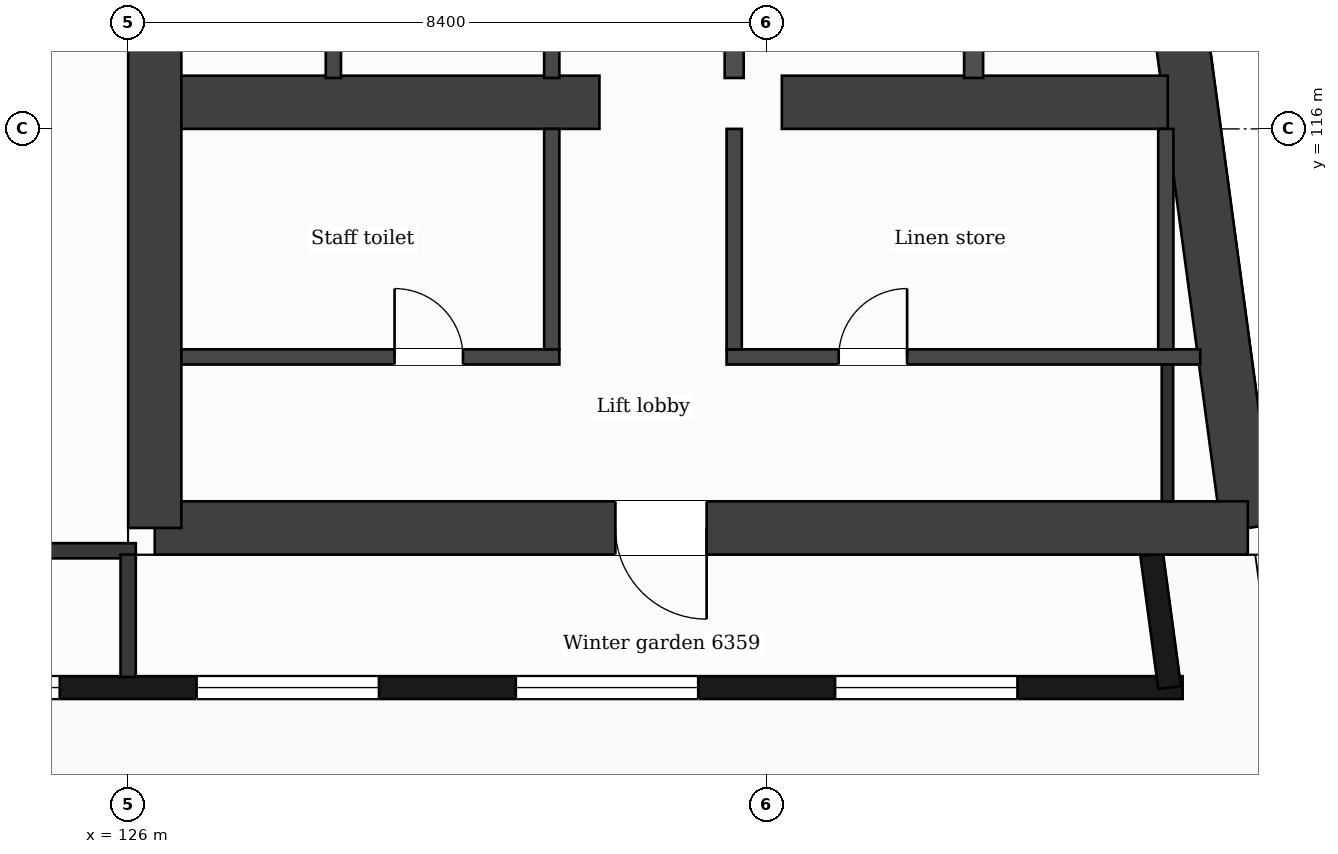
"""IFC4 building model, lengths in metres.
Left out: names, types, materials, properties, quantities, classifications, styles, units other than length and angle.
Written with IfcOpenShell. Run it as: python <this file> out.ifc"""

import sys

from ifc_helpers import new_model, si_unit, direction, frame, frame_2d, origin, place, context, subcontext, project, spatial, rectangle, extrude, element, fill, save


model = new_model("IFC4")
c1 = context("Model", 3, precision=1e-05, world=origin(), true_north=direction((0.0, 1.0)))
c2 = subcontext(c1, "Body", "Model", "MODEL_VIEW")
j1 = project(units=[si_unit("LENGTHUNIT", "METRE"), si_unit("PLANEANGLEUNIT", "RADIAN")], contexts=[c1])
p1 = place(None, origin())
s1 = spatial("IfcSite", under=j1, at=p1, CompositionType="ELEMENT")
p2 = place(p1, origin())
s2 = spatial("IfcBuilding", under=s1, at=p2, CompositionType="ELEMENT")
p3 = place(p2, frame((0.0, 0.0, 262.7)))
s3 = spatial("IfcBuildingStorey", under=s2, at=p3, CompositionType="ELEMENT", Elevation=262.7)
p4 = place(p3, frame((137.863, 132.05, 0.0), z_axis=(0.0, 0.0, 1.0), x_axis=(0.133406218907, -0.991061441464, 0.0)))
e1 = element("IfcWall", 1, at=p4, inside=s3, PredefinedType="SHEAR", context=c2, shape_type="SweptSolid", body=[
    extrude(rectangle(XDim=21.492, YDim=0.7, at=frame_2d((10.746, 0.0))), origin(), (0.0, 0.0, 1.0), 3.7),
])
p5 = place(p3, frame((140.73, 110.75, 0.0), z_axis=(0.0, 0.0, 1.0), x_axis=(-1.0, 0.0, 0.0)))
e2 = element("IfcWall", 2, at=p5, inside=s3, PredefinedType="SHEAR", context=c2, shape_type="SweptSolid", body=[
    extrude(rectangle(XDim=14.38, YDim=0.7, at=frame_2d((7.19, 0.0))), origin(), (0.0, 0.0, 1.0), 3.7),
])
p6 = place(p5, frame((7.12, 0.0, 0.0)))
e3 = element("IfcOpeningElement", 3, at=p6, cuts=e2, PredefinedType="OPENING", context=c2, shape_type="SweptSolid", body=[
    extrude(rectangle(XDim=1.2, YDim=2.1, at=frame_2d((0.6, 1.05))), frame((0.0, 0.36, 0.0), z_axis=(0.0, -1.0, 0.0), x_axis=(1.0, 0.0, 0.0)), (0.0, 0.0, 1.0), 0.72),
])
p7 = place(p3, frame((126.35, 110.75, 0.0), z_axis=(0.0, 0.0, 1.0), x_axis=(0.0, 1.0, 0.0)))
e4 = element("IfcWall", 4, at=p7, inside=s3, PredefinedType="SHEAR", context=c2, shape_type="SweptSolid", body=[
    extrude(rectangle(XDim=21.3, YDim=0.7, at=frame_2d((10.65, 0.0))), origin(), (0.0, 0.0, 1.0), 3.7),
])
p8 = place(p7, frame((12.0, 0.0, 0.0)))
e5 = element("IfcOpeningElement", 5, at=p8, cuts=e4, PredefinedType="OPENING", context=c2, shape_type="SweptSolid", body=[
    extrude(rectangle(XDim=1.4, YDim=2.1, at=frame_2d((0.7, 1.05))), frame((0.0, 0.36, 0.0), z_axis=(0.0, -1.0, 0.0), x_axis=(1.0, 0.0, 0.0)), (0.0, 0.0, 1.0), 0.72),
])
p9 = place(p3, frame((126.7, 116.35, 0.0), z_axis=(0.0, 0.0, 1.0), x_axis=(1.0, 0.0, 0.0)))
e6 = element("IfcWall", 6, at=p9, inside=s3, PredefinedType="SHEAR", context=c2, shape_type="SweptSolid", body=[
    extrude(rectangle(XDim=5.5, YDim=0.7, at=frame_2d((2.75, 0.0))), origin(), (0.0, 0.0, 1.0), 3.7),
])
p10 = place(p3, frame((134.6, 116.35, 0.0), z_axis=(0.0, 0.0, 1.0), x_axis=(1.0, 0.0, 0.0)))
e7 = element("IfcWall", 7, at=p10, inside=s3, PredefinedType="SHEAR", context=c2, shape_type="SweptSolid", body=[
    extrude(rectangle(XDim=5.077, YDim=0.7, at=frame_2d((2.539, 0.0))), origin(), (0.0, 0.0, 1.0), 3.7),
])
p11 = place(p3, frame((87.099, 108.65, 0.0), z_axis=(0.0, 0.0, 1.0), x_axis=(1.0, 0.0, 0.0)))
e8 = element("IfcWall", 8, at=p11, inside=s3, PredefinedType="SOLIDWALL", context=c2, shape_type="SweptSolid", body=[
    extrude(rectangle(XDim=52.774, YDim=0.3, at=frame_2d((26.387, 0.0))), origin(), (0.0, 0.0, 1.0), 3.38),
])
p12 = place(p11, frame((1.701, 0.0, 0.0)))
e9 = element("IfcOpeningElement", 9, at=p12, cuts=e8, PredefinedType="OPENING", context=c2, shape_type="SweptSolid", body=[
    extrude(rectangle(XDim=1.2, YDim=2.4, at=frame_2d((0.6, 1.2))), frame((0.0, 0.16, 0.0), z_axis=(0.0, -1.0, 0.0), x_axis=(1.0, 0.0, 0.0)), (0.0, 0.0, 1.0), 0.32),
])
p13 = place(p11, frame((3.501, 0.0, 0.9)))
e10 = element("IfcOpeningElement", 10, at=p13, cuts=e8, PredefinedType="OPENING", context=c2, shape_type="SweptSolid", body=[
    extrude(rectangle(XDim=1.2, YDim=2.1, at=frame_2d((0.6, 1.05))), frame((0.0, 0.16, 0.0), z_axis=(0.0, -1.0, 0.0), x_axis=(1.0, 0.0, 0.0)), (0.0, 0.0, 1.0), 0.32),
])
p14 = place(p11, frame((6.201, 0.0, 0.9)))
e11 = element("IfcOpeningElement", 11, at=p14, cuts=e8, PredefinedType="OPENING", context=c2, shape_type="SweptSolid", body=[
    extrude(rectangle(XDim=2.4, YDim=2.1, at=frame_2d((1.2, 1.05))), frame((0.0, 0.16, 0.0), z_axis=(0.0, -1.0, 0.0), x_axis=(1.0, 0.0, 0.0)), (0.0, 0.0, 1.0), 0.32),
])
p15 = place(p11, frame((10.102, 0.0, 0.0)))
e12 = element("IfcOpeningElement", 12, at=p15, cuts=e8, PredefinedType="OPENING", context=c2, shape_type="SweptSolid", body=[
    extrude(rectangle(XDim=1.2, YDim=2.4, at=frame_2d((0.6, 1.2))), frame((0.0, 0.16, 0.0), z_axis=(0.0, -1.0, 0.0), x_axis=(1.0, 0.0, 0.0)), (0.0, 0.0, 1.0), 0.32),
])
p16 = place(p11, frame((11.901, 0.0, 0.9)))
e13 = element("IfcOpeningElement", 13, at=p16, cuts=e8, PredefinedType="OPENING", context=c2, shape_type="SweptSolid", body=[
    extrude(rectangle(XDim=1.2, YDim=2.1, at=frame_2d((0.6, 1.05))), frame((0.0, 0.16, 0.0), z_axis=(0.0, -1.0, 0.0), x_axis=(1.0, 0.0, 0.0)), (0.0, 0.0, 1.0), 0.32),
])
p17 = place(p11, frame((14.602, 0.0, 0.9)))
e14 = element("IfcOpeningElement", 14, at=p17, cuts=e8, PredefinedType="OPENING", context=c2, shape_type="SweptSolid", body=[
    extrude(rectangle(XDim=2.4, YDim=2.1, at=frame_2d((1.2, 1.05))), frame((0.0, 0.16, 0.0), z_axis=(0.0, -1.0, 0.0), x_axis=(1.0, 0.0, 0.0)), (0.0, 0.0, 1.0), 0.32),
])
p18 = place(p11, frame((18.802, 0.0, 0.9)))
e15 = element("IfcOpeningElement", 15, at=p18, cuts=e8, PredefinedType="OPENING", context=c2, shape_type="SweptSolid", body=[
    extrude(rectangle(XDim=2.4, YDim=2.1, at=frame_2d((1.2, 1.05))), frame((0.0, 0.16, 0.0), z_axis=(0.0, -1.0, 0.0), x_axis=(1.0, 0.0, 0.0)), (0.0, 0.0, 1.0), 0.32),
])
p19 = place(p11, frame((23.602, 0.0, 0.9)))
e16 = element("IfcOpeningElement", 16, at=p19, cuts=e8, PredefinedType="OPENING", context=c2, shape_type="SweptSolid", body=[
    extrude(rectangle(XDim=1.2, YDim=2.1, at=frame_2d((0.6, 1.05))), frame((0.0, 0.16, 0.0), z_axis=(0.0, -1.0, 0.0), x_axis=(1.0, 0.0, 0.0)), (0.0, 0.0, 1.0), 0.32),
])
p20 = place(p11, frame((27.802, 0.0, 0.9)))
e17 = element("IfcOpeningElement", 17, at=p20, cuts=e8, PredefinedType="OPENING", context=c2, shape_type="SweptSolid", body=[
    extrude(rectangle(XDim=1.2, YDim=2.1, at=frame_2d((0.6, 1.05))), frame((0.0, 0.16, 0.0), z_axis=(0.0, -1.0, 0.0), x_axis=(1.0, 0.0, 0.0)), (0.0, 0.0, 1.0), 0.32),
])
p21 = place(p11, frame((31.401, 0.0, 0.9)))
e18 = element("IfcOpeningElement", 18, at=p21, cuts=e8, PredefinedType="OPENING", context=c2, shape_type="SweptSolid", body=[
    extrude(rectangle(XDim=2.4, YDim=2.1, at=frame_2d((1.2, 1.05))), frame((0.0, 0.16, 0.0), z_axis=(0.0, -1.0, 0.0), x_axis=(1.0, 0.0, 0.0)), (0.0, 0.0, 1.0), 0.32),
])
p22 = place(p11, frame((35.602, 0.0, 0.9)))
e19 = element("IfcOpeningElement", 19, at=p22, cuts=e8, PredefinedType="OPENING", context=c2, shape_type="SweptSolid", body=[
    extrude(rectangle(XDim=2.4, YDim=2.1, at=frame_2d((1.2, 1.05))), frame((0.0, 0.16, 0.0), z_axis=(0.0, -1.0, 0.0), x_axis=(1.0, 0.0, 0.0)), (0.0, 0.0, 1.0), 0.32),
])
p23 = place(p11, frame((39.802, 0.0, 0.9)))
e20 = element("IfcOpeningElement", 20, at=p23, cuts=e8, PredefinedType="OPENING", context=c2, shape_type="SweptSolid", body=[
    extrude(rectangle(XDim=2.4, YDim=2.1, at=frame_2d((1.2, 1.05))), frame((0.0, 0.16, 0.0), z_axis=(0.0, -1.0, 0.0), x_axis=(1.0, 0.0, 0.0)), (0.0, 0.0, 1.0), 0.32),
])
p24 = place(p11, frame((44.001, 0.0, 0.9)))
e21 = element("IfcOpeningElement", 21, at=p24, cuts=e8, PredefinedType="OPENING", context=c2, shape_type="SweptSolid", body=[
    extrude(rectangle(XDim=2.4, YDim=2.1, at=frame_2d((1.2, 1.05))), frame((0.0, 0.16, 0.0), z_axis=(0.0, -1.0, 0.0), x_axis=(1.0, 0.0, 0.0)), (0.0, 0.0, 1.0), 0.32),
])
p25 = place(p11, frame((48.201, 0.0, 0.9)))
e22 = element("IfcOpeningElement", 22, at=p25, cuts=e8, PredefinedType="OPENING", context=c2, shape_type="SweptSolid", body=[
    extrude(rectangle(XDim=2.4, YDim=2.1, at=frame_2d((1.2, 1.05))), frame((0.0, 0.16, 0.0), z_axis=(0.0, -1.0, 0.0), x_axis=(1.0, 0.0, 0.0)), (0.0, 0.0, 1.0), 0.32),
])
p26 = place(p3, frame((139.701, 108.65, 0.0), z_axis=(0.0, 0.0, 1.0), x_axis=(-0.133422458344, 0.991059255347, 0.0)))
e23 = element("IfcWall", 23, at=p26, inside=s3, PredefinedType="SOLIDWALL", context=c2, shape_type="SweptSolid", body=[
    extrude(rectangle(XDim=1.766, YDim=0.3, at=frame_2d((0.883, 0.0))), origin(), (0.0, 0.0, 1.0), 3.38),
])
p27 = place(p3, frame((100.7, 110.45, 0.0), z_axis=(0.0, 0.0, 1.0), x_axis=(1.0, 0.0, 0.0)))
e24 = element("IfcWall", 24, at=p27, inside=s3, PredefinedType="PARTITIONING", context=c2, shape_type="SweptSolid", body=[
    extrude(rectangle(XDim=25.4, YDim=0.2, at=frame_2d((12.7, 0.0))), origin(), (0.0, 0.0, 1.0), 3.38),
])
p28 = place(p3, frame((126.7, 113.0, 0.0), z_axis=(0.0, 0.0, 1.0), x_axis=(1.0, 0.0, 0.0)))
e25 = element("IfcWall", 25, at=p28, inside=s3, PredefinedType="PARTITIONING", context=c2, shape_type="SweptSolid", body=[
    extrude(rectangle(XDim=4.973, YDim=0.2, at=frame_2d((2.487, 0.0))), origin(), (0.0, 0.0, 1.0), 3.38),
])
p29 = place(p28, frame((2.805, 0.0, 0.0)))
e26 = element("IfcOpeningElement", 26, at=p29, cuts=e25, PredefinedType="OPENING", context=c2, shape_type="SweptSolid", body=[
    extrude(rectangle(XDim=0.9, YDim=2.1, at=frame_2d((0.45, 1.05))), frame((0.0, 0.11, 0.0), z_axis=(0.0, -1.0, 0.0), x_axis=(1.0, 0.0, 0.0)), (0.0, 0.0, 1.0), 0.22),
])
p30 = place(p3, frame((133.873, 113.0, 0.0), z_axis=(0.0, 0.0, 1.0), x_axis=(1.0, 0.0, 0.0)))
e27 = element("IfcWall", 27, at=p30, inside=s3, PredefinedType="PARTITIONING", context=c2, shape_type="SweptSolid", body=[
    extrude(rectangle(XDim=6.231, YDim=0.2, at=frame_2d((3.116, 0.0))), origin(), (0.0, 0.0, 1.0), 3.38),
])
p31 = place(p30, frame((1.475, 0.0, 0.0)))
e28 = element("IfcOpeningElement", 28, at=p31, cuts=e27, PredefinedType="OPENING", context=c2, shape_type="SweptSolid", body=[
    extrude(rectangle(XDim=0.9, YDim=2.1, at=frame_2d((0.45, 1.05))), frame((0.0, 0.11, 0.0), z_axis=(0.0, -1.0, 0.0), x_axis=(1.0, 0.0, 0.0)), (0.0, 0.0, 1.0), 0.22),
])
p32 = place(p3, frame((126.0, 108.79, 0.0), z_axis=(0.0, 0.0, 1.0), x_axis=(0.0, 1.0, 0.0)))
e29 = element("IfcWall", 29, at=p32, inside=s3, PredefinedType="PARTITIONING", context=c2, shape_type="SweptSolid", body=[
    extrude(rectangle(XDim=1.61, YDim=0.2, at=frame_2d((0.805, 0.0))), origin(), (0.0, 0.0, 1.0), 3.38),
])
p33 = place(p3, frame((128.7, 116.67, 0.0), z_axis=(0.0, 0.0, 1.0), x_axis=(0.0, 1.0, 0.0)))
e30 = element("IfcWall", 30, at=p33, inside=s3, PredefinedType="PARTITIONING", context=c2, shape_type="SweptSolid", body=[
    extrude(rectangle(XDim=2.03, YDim=0.2, at=frame_2d((1.015, 0.0))), origin(), (0.0, 0.0, 1.0), 3.38),
])
p34 = place(p3, frame((131.573, 113.1, 0.0), z_axis=(0.0, 0.0, 1.0), x_axis=(0.0, 1.0, 0.0)))
e31 = element("IfcWall", 31, at=p34, inside=s3, PredefinedType="PARTITIONING", context=c2, shape_type="SweptSolid", body=[
    extrude(rectangle(XDim=2.9, YDim=0.2, at=frame_2d((1.45, 0.0))), origin(), (0.0, 0.0, 1.0), 3.38),
])
p35 = place(p3, frame((131.573, 116.67, 0.0), z_axis=(0.0, 0.0, 1.0), x_axis=(0.0, 1.0, 0.0)))
e32 = element("IfcWall", 32, at=p35, inside=s3, PredefinedType="PARTITIONING", context=c2, shape_type="SweptSolid", body=[
    extrude(rectangle(XDim=5.33, YDim=0.2, at=frame_2d((2.665, 0.0))), origin(), (0.0, 0.0, 1.0), 3.38),
])
p36 = place(p35, frame((0.88, 0.0, 0.0)))
e33 = element("IfcOpeningElement", 33, at=p36, cuts=e32, PredefinedType="OPENING", context=c2, shape_type="SweptSolid", body=[
    extrude(rectangle(XDim=0.9, YDim=2.1, at=frame_2d((0.45, 1.05))), frame((0.0, 0.11, 0.0), z_axis=(0.0, -1.0, 0.0), x_axis=(1.0, 0.0, 0.0)), (0.0, 0.0, 1.0), 0.22),
])
p37 = place(p3, frame((133.973, 113.1, 0.0), z_axis=(0.0, 0.0, 1.0), x_axis=(0.0, 1.0, 0.0)))
e34 = element("IfcWall", 34, at=p37, inside=s3, PredefinedType="PARTITIONING", context=c2, shape_type="SweptSolid", body=[
    extrude(rectangle(XDim=2.9, YDim=0.2, at=frame_2d((1.45, 0.0))), origin(), (0.0, 0.0, 1.0), 3.38),
])
p38 = place(p3, frame((133.973, 116.67, 0.0), z_axis=(0.0, 0.0, 1.0), x_axis=(0.0, 1.0, 0.0)))
e35 = element("IfcWall", 35, at=p38, inside=s3, PredefinedType="PARTITIONING", context=c2, shape_type="SweptSolid", body=[
    extrude(rectangle(XDim=7.155, YDim=0.25, at=frame_2d((3.578, 0.0))), origin(), (0.0, 0.0, 1.0), 3.38),
])
p39 = place(p38, frame((5.855, 0.0, 0.0)))
e36 = element("IfcOpeningElement", 36, at=p39, cuts=e35, PredefinedType="OPENING", context=c2, shape_type="SweptSolid", body=[
    extrude(rectangle(XDim=0.95, YDim=2.1, at=frame_2d((0.475, 1.05))), frame((0.0, 0.135, 0.0), z_axis=(0.0, -1.0, 0.0), x_axis=(1.0, 0.0, 0.0)), (0.0, 0.0, 1.0), 0.27),
])
p40 = place(p3, frame((137.123, 116.67, 0.0), z_axis=(0.0, 0.0, 1.0), x_axis=(0.0, 1.0, 0.0)))
e37 = element("IfcWall", 37, at=p40, inside=s3, PredefinedType="PARTITIONING", context=c2, shape_type="SweptSolid", body=[
    extrude(rectangle(XDim=7.155, YDim=0.25, at=frame_2d((3.578, 0.0))), origin(), (0.0, 0.0, 1.0), 3.38),
])
p41 = place(p3, frame((139.652, 113.1, 0.0), z_axis=(0.0, 0.0, 1.0), x_axis=(0.0, 1.0, 0.0)))
e38 = element("IfcWall", 38, at=p41, inside=s3, PredefinedType="PARTITIONING", context=c2, shape_type="SweptSolid", body=[
    extrude(rectangle(XDim=2.9, YDim=0.2, at=frame_2d((1.45, 0.0))), origin(), (0.0, 0.0, 1.0), 3.38),
])
p42 = place(p3, frame((139.673, 111.1, 0.0), z_axis=(0.0, 0.0, 1.0), x_axis=(0.0, 1.0, 0.0)))
e39 = element("IfcWall", 39, at=p42, inside=s3, PredefinedType="PARTITIONING", context=c2, shape_type="SweptSolid", body=[
    extrude(rectangle(XDim=1.8, YDim=0.15, at=frame_2d((0.9, 0.0))), origin(), (0.0, 0.0, 1.0), 3.38),
])
p43 = place(p22, origin())
e40 = element("IfcWindow", 40, at=p43, inside=s3, PartitioningType="SINGLE_PANEL", PredefinedType="WINDOW", context=c2, shape_type="SweptSolid", body=[
    extrude(rectangle(XDim=2.4, YDim=2.1, at=frame_2d((1.2, 1.05))), frame((0.0, 0.03, 0.0), z_axis=(0.0, -1.0, 0.0), x_axis=(1.0, 0.0, 0.0)), (0.0, 0.0, 1.0), 0.06),
])
fill(e19, e40)
p44 = place(p23, origin())
e41 = element("IfcWindow", 41, at=p44, inside=s3, PartitioningType="SINGLE_PANEL", PredefinedType="WINDOW", context=c2, shape_type="SweptSolid", body=[
    extrude(rectangle(XDim=2.4, YDim=2.1, at=frame_2d((1.2, 1.05))), frame((0.0, 0.03, 0.0), z_axis=(0.0, -1.0, 0.0), x_axis=(1.0, 0.0, 0.0)), (0.0, 0.0, 1.0), 0.06),
])
fill(e20, e41)
p45 = place(p24, origin())
e42 = element("IfcWindow", 42, at=p45, inside=s3, PartitioningType="SINGLE_PANEL", PredefinedType="WINDOW", context=c2, shape_type="SweptSolid", body=[
    extrude(rectangle(XDim=2.4, YDim=2.1, at=frame_2d((1.2, 1.05))), frame((0.0, 0.03, 0.0), z_axis=(0.0, -1.0, 0.0), x_axis=(1.0, 0.0, 0.0)), (0.0, 0.0, 1.0), 0.06),
])
fill(e21, e42)
p46 = place(p25, origin())
e43 = element("IfcWindow", 43, at=p46, inside=s3, PartitioningType="SINGLE_PANEL", PredefinedType="WINDOW", context=c2, shape_type="SweptSolid", body=[
    extrude(rectangle(XDim=2.4, YDim=2.1, at=frame_2d((1.2, 1.05))), frame((0.0, 0.03, 0.0), z_axis=(0.0, -1.0, 0.0), x_axis=(1.0, 0.0, 0.0)), (0.0, 0.0, 1.0), 0.06),
])
fill(e22, e43)
p47 = place(p31, origin())
e44 = element("IfcDoor", 44, at=p47, inside=s3, OperationType="SINGLE_SWING_RIGHT", PredefinedType="DOOR", context=c2, shape_type="SweptSolid", body=[
    extrude(rectangle(XDim=0.9, YDim=2.1, at=frame_2d((0.45, 1.05))), frame((0.0, 0.025, 0.0), z_axis=(0.0, -1.0, 0.0), x_axis=(1.0, 0.0, 0.0)), (0.0, 0.0, 1.0), 0.05),
])
fill(e28, e44)
p48 = place(p29, origin())
e45 = element("IfcDoor", 45, at=p48, inside=s3, OperationType="SINGLE_SWING_LEFT", PredefinedType="DOOR", context=c2, shape_type="SweptSolid", body=[
    extrude(rectangle(XDim=0.9, YDim=2.1, at=frame_2d((0.45, 1.05))), frame((0.0, 0.025, 0.0), z_axis=(0.0, -1.0, 0.0), x_axis=(1.0, 0.0, 0.0)), (0.0, 0.0, 1.0), 0.05),
])
fill(e26, e45)
p49 = place(p6, origin())
e46 = element("IfcDoor", 46, at=p49, inside=s3, OperationType="SINGLE_SWING_LEFT", PredefinedType="DOOR", context=c2, shape_type="SweptSolid", body=[
    extrude(rectangle(XDim=1.2, YDim=2.1, at=frame_2d((0.6, 1.05))), frame((0.0, 0.025, 0.0), z_axis=(0.0, -1.0, 0.0), x_axis=(1.0, 0.0, 0.0)), (0.0, 0.0, 1.0), 0.05),
])
fill(e3, e46)
save(model, sys.argv[1])
